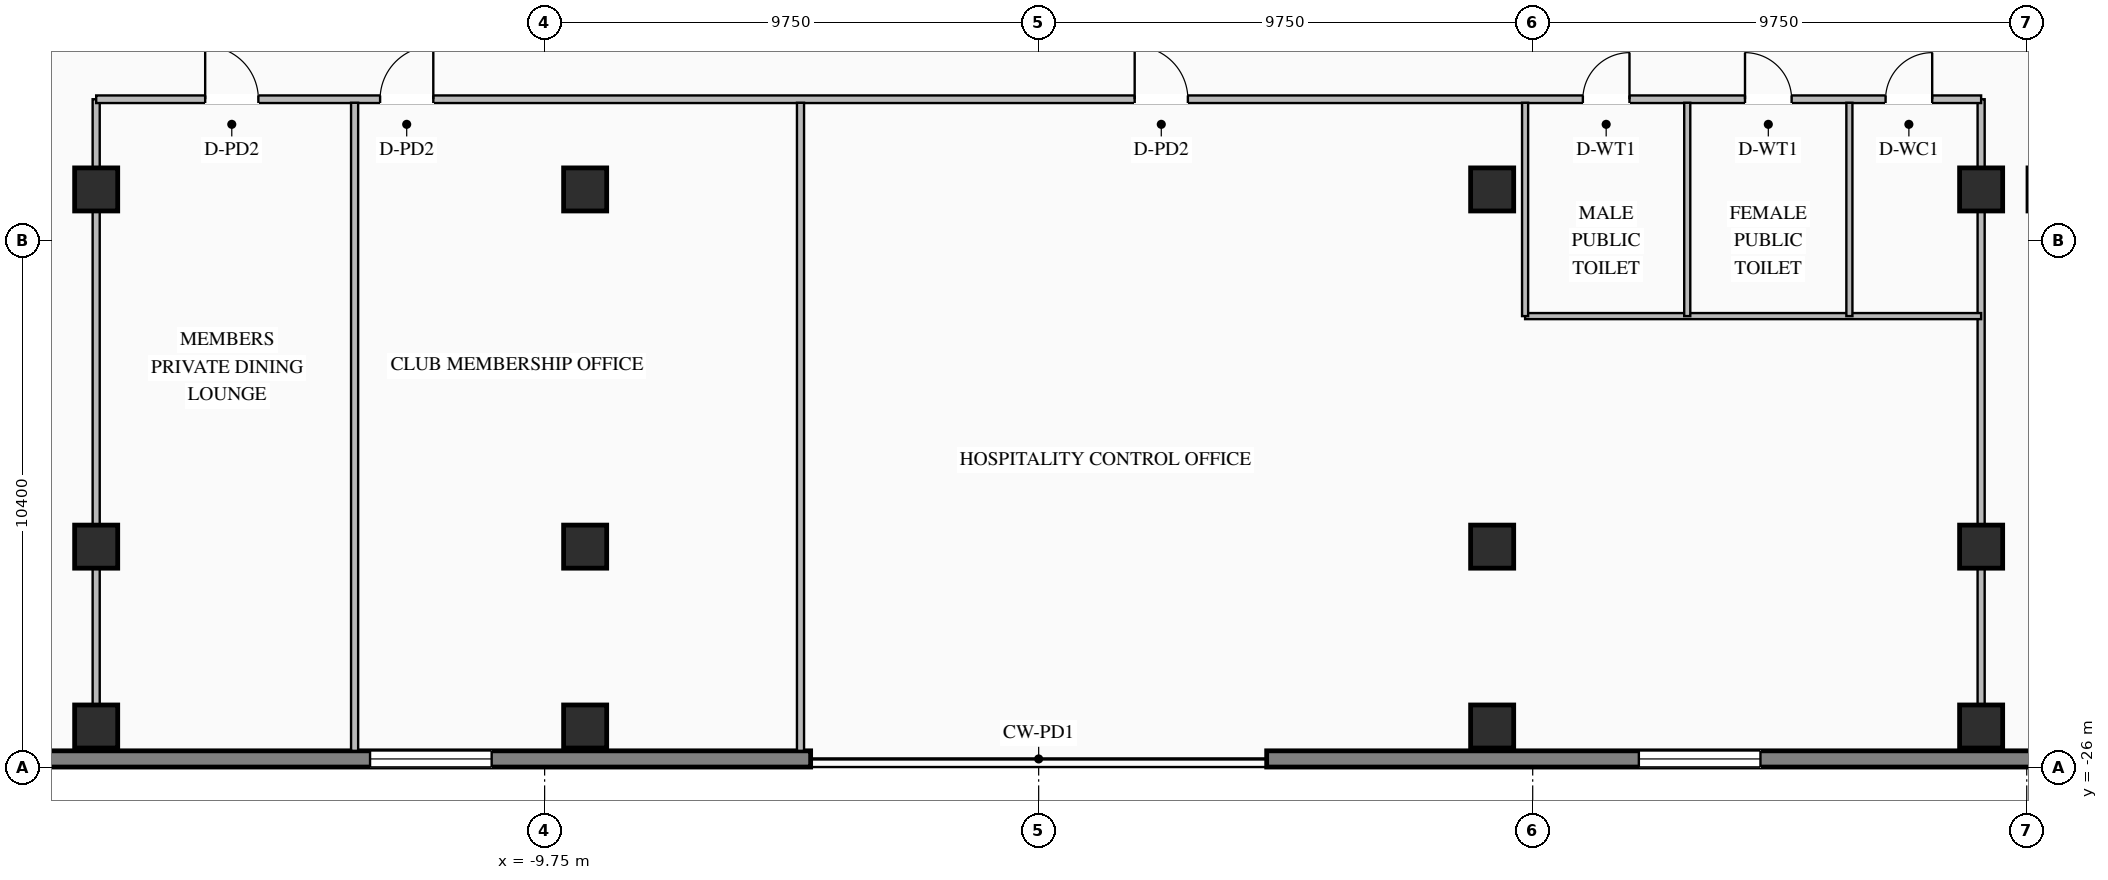
"""IFC4 building model, lengths in metres.
Left out: names, types, materials, properties, quantities, classifications, styles, units other than length and angle.
Written with IfcOpenShell. Run it as: python <this file> out.ifc"""

import sys

from ifc_helpers import new_model, si_unit, direction, frame, frame_2d, origin, origin_2d, place, context, subcontext, project, spatial, rectangle, i_section, extrude, element, fill, save


model = new_model("IFC4")
c1 = context("Model", 3, precision=1e-05, world=origin(), true_north=direction((0.0, 1.0)))
c2 = subcontext(c1, "Body", "Model", "MODEL_VIEW")
j1 = project(units=[si_unit("LENGTHUNIT", "METRE"), si_unit("PLANEANGLEUNIT", "RADIAN")], contexts=[c1])
p1 = place(None, origin())
s1 = spatial("IfcSite", under=j1, at=p1, CompositionType="ELEMENT")
p2 = place(p1, origin())
s2 = spatial("IfcBuilding", under=s1, at=p2, CompositionType="ELEMENT")
p3 = place(p2, frame((0.0, 0.0, 22.8)))
s3 = spatial("IfcBuildingStorey", under=s2, at=p3, CompositionType="ELEMENT", Elevation=22.8)
for number, where, z_axis, x_axis in (
    (1, (-18.6, -14.6, 0.0), (0.0, 0.0, 1.0), (1.0, 0.0, 0.0)),
    (2, (-8.95, -14.6, 0.0), (0.0, 0.0, 1.0), (1.0, 0.0, 0.0)),
    (3, (8.95, -14.6, 0.0), (0.0, 0.0, 1.0), (1.0, 0.0, 0.0)),
    (4, (18.6, -14.6, 0.0), (0.0, 0.0, 1.0), (1.0, 0.0, 0.0)),
    (5, (19.95, -14.6, 0.0), (0.0, 0.0, 1.0), (1.0, 0.0, 0.0)),
    (6, (-18.6, -21.65, 0.0), (0.0, 0.0, 1.0), (1.0, 0.0, 0.0)),
    (7, (-8.95, -21.65, 0.0), (0.0, 0.0, 1.0), (1.0, 0.0, 0.0)),
    (8, (8.95, -21.65, 0.0), (0.0, 0.0, 1.0), (1.0, 0.0, 0.0)),
    (9, (18.6, -21.65, 0.0), (0.0, 0.0, 1.0), (1.0, 0.0, 0.0)),
    (10, (-18.6, -25.2, 0.0), (0.0, 0.0, 1.0), (1.0, 0.0, 0.0)),
    (11, (-8.95, -25.2, 0.0), (0.0, 0.0, 1.0), (1.0, 0.0, 0.0)),
    (12, (8.95, -25.2, 0.0), (0.0, 0.0, 1.0), (1.0, 0.0, 0.0)),
    (13, (18.6, -25.2, 0.0), (0.0, 0.0, 1.0), (1.0, 0.0, 0.0)),
):
    element("IfcColumn", number, at=place(p3, frame(where, z_axis=z_axis, x_axis=x_axis)), inside=s3, PredefinedType="COLUMN", context=c2, shape_type="SweptSolid", body=[
        extrude(i_section(OverallWidth=0.85, OverallDepth=0.85, WebThickness=0.032, FlangeThickness=0.048, at=origin_2d()), origin(), (0.0, 0.0, 1.0), 4.2),
    ])
p4 = place(p3, frame((38.68, -25.84, 0.0), z_axis=(0.0, 0.0, 1.0), x_axis=(-1.0, 0.0, 0.0)))
e14 = element("IfcWall", 14, at=p4, inside=s3, PredefinedType="STANDARD", context=c2, shape_type="SweptSolid", body=[
    extrude(rectangle(XDim=34.18, YDim=0.32, at=frame_2d((17.09, 0.0))), origin(), (0.0, 0.0, 1.0), 3.9),
])
p5 = place(p4, frame((6.795, 0.0, 0.8)))
e15 = element("IfcOpeningElement", 15, at=p5, cuts=e14, PredefinedType="OPENING", context=c2, shape_type="SweptSolid", body=[
    extrude(rectangle(XDim=2.4, YDim=2.35, at=frame_2d((1.2, 1.175))), frame((0.0, 0.17, 0.0), z_axis=(0.0, -1.0, 0.0), x_axis=(1.0, 0.0, 0.0)), (0.0, 0.0, 1.0), 0.34),
])
p6 = place(p4, frame((16.44, 0.0, 0.8)))
e16 = element("IfcOpeningElement", 16, at=p6, cuts=e14, PredefinedType="OPENING", context=c2, shape_type="SweptSolid", body=[
    extrude(rectangle(XDim=2.4, YDim=2.35, at=frame_2d((1.2, 1.175))), frame((0.0, 0.17, 0.0), z_axis=(0.0, -1.0, 0.0), x_axis=(1.0, 0.0, 0.0)), (0.0, 0.0, 1.0), 0.34),
])
p7 = place(p4, frame((24.435, 0.0, 0.8)))
e17 = element("IfcOpeningElement", 17, at=p7, cuts=e14, PredefinedType="OPENING", context=c2, shape_type="SweptSolid", body=[
    extrude(rectangle(XDim=2.4, YDim=2.35, at=frame_2d((1.2, 1.175))), frame((0.0, 0.17, 0.0), z_axis=(0.0, -1.0, 0.0), x_axis=(1.0, 0.0, 0.0)), (0.0, 0.0, 1.0), 0.34),
])
p8 = place(p3, frame((-4.5, -25.84, 0.0), z_axis=(0.0, 0.0, 1.0), x_axis=(-1.0, 0.0, 0.0)))
e18 = element("IfcWall", 18, at=p8, inside=s3, PredefinedType="STANDARD", context=c2, shape_type="SweptSolid", body=[
    extrude(rectangle(XDim=34.18, YDim=0.32, at=frame_2d((17.09, 0.0))), origin(), (0.0, 0.0, 1.0), 3.9),
])
p9 = place(p8, frame((6.295, 0.0, 0.8)))
e19 = element("IfcOpeningElement", 19, at=p9, cuts=e18, PredefinedType="OPENING", context=c2, shape_type="SweptSolid", body=[
    extrude(rectangle(XDim=2.4, YDim=2.35, at=frame_2d((1.2, 1.175))), frame((0.0, 0.17, 0.0), z_axis=(0.0, -1.0, 0.0), x_axis=(1.0, 0.0, 0.0)), (0.0, 0.0, 1.0), 0.34),
])
p10 = place(p8, frame((15.34, 0.0, 0.8)))
e20 = element("IfcOpeningElement", 20, at=p10, cuts=e18, PredefinedType="OPENING", context=c2, shape_type="SweptSolid", body=[
    extrude(rectangle(XDim=2.4, YDim=2.35, at=frame_2d((1.2, 1.175))), frame((0.0, 0.17, 0.0), z_axis=(0.0, -1.0, 0.0), x_axis=(1.0, 0.0, 0.0)), (0.0, 0.0, 1.0), 0.34),
])
p11 = place(p8, frame((24.985, 0.0, 0.8)))
e21 = element("IfcOpeningElement", 21, at=p11, cuts=e18, PredefinedType="OPENING", context=c2, shape_type="SweptSolid", body=[
    extrude(rectangle(XDim=2.4, YDim=2.35, at=frame_2d((1.2, 1.175))), frame((0.0, 0.17, 0.0), z_axis=(0.0, -1.0, 0.0), x_axis=(1.0, 0.0, 0.0)), (0.0, 0.0, 1.0), 0.34),
])
for number, where, z_axis, x_axis in (
    (22, (-18.6, -25.68, 0.0), (0.0, 0.0, 1.0), (0.0, 1.0, 0.0)),
    (23, (18.6, -25.68, 0.0), (0.0, 0.0, 1.0), (0.0, 1.0, 0.0)),
):
    element("IfcWall", number, at=place(p3, frame(where, z_axis=z_axis, x_axis=x_axis)), inside=s3, PredefinedType="STANDARD", context=c2, shape_type="SweptSolid", body=[
        extrude(rectangle(XDim=12.86, YDim=0.14, at=frame_2d((6.43, 0.0))), origin(), (0.0, 0.0, 1.0), 3.295),
    ])
p12 = place(p3, frame((-18.6, -12.82, 0.0), z_axis=(0.0, 0.0, 1.0), x_axis=(1.0, 0.0, 0.0)))
e24 = element("IfcWall", 24, at=p12, inside=s3, PredefinedType="STANDARD", context=c2, shape_type="SweptSolid", body=[
    extrude(rectangle(XDim=37.2, YDim=0.15, at=frame_2d((18.6, 0.0))), origin(), (0.0, 0.0, 1.0), 3.9),
])
p13 = place(p12, frame((29.34, 0.0, 0.0)))
e25 = element("IfcOpeningElement", 25, at=p13, cuts=e24, PredefinedType="OPENING", context=c2, shape_type="SweptSolid", body=[
    extrude(rectangle(XDim=0.92, YDim=2.08, at=frame_2d((0.46, 1.04))), frame((0.0, 0.085, 0.0), z_axis=(0.0, -1.0, 0.0), x_axis=(1.0, 0.0, 0.0)), (0.0, 0.0, 1.0), 0.17),
])
p14 = place(p12, frame((32.54, 0.0, 0.0)))
e26 = element("IfcOpeningElement", 26, at=p14, cuts=e24, PredefinedType="OPENING", context=c2, shape_type="SweptSolid", body=[
    extrude(rectangle(XDim=0.92, YDim=2.08, at=frame_2d((0.46, 1.04))), frame((0.0, 0.085, 0.0), z_axis=(0.0, -1.0, 0.0), x_axis=(1.0, 0.0, 0.0)), (0.0, 0.0, 1.0), 0.17),
])
p15 = place(p12, frame((35.314, 0.0, 0.0)))
e27 = element("IfcOpeningElement", 27, at=p15, cuts=e24, PredefinedType="OPENING", context=c2, shape_type="SweptSolid", body=[
    extrude(rectangle(XDim=0.92, YDim=2.08, at=frame_2d((0.46, 1.04))), frame((0.0, 0.085, 0.0), z_axis=(0.0, -1.0, 0.0), x_axis=(1.0, 0.0, 0.0)), (0.0, 0.0, 1.0), 0.17),
])
p16 = place(p12, frame((2.151, 0.0, 0.0)))
e28 = element("IfcOpeningElement", 28, at=p16, cuts=e24, PredefinedType="OPENING", context=c2, shape_type="SweptSolid", body=[
    extrude(rectangle(XDim=1.05, YDim=2.08, at=frame_2d((0.525, 1.04))), frame((0.0, 0.085, 0.0), z_axis=(0.0, -1.0, 0.0), x_axis=(1.0, 0.0, 0.0)), (0.0, 0.0, 1.0), 0.17),
])
p17 = place(p12, frame((5.603, 0.0, 0.0)))
e29 = element("IfcOpeningElement", 29, at=p17, cuts=e24, PredefinedType="OPENING", context=c2, shape_type="SweptSolid", body=[
    extrude(rectangle(XDim=1.05, YDim=2.08, at=frame_2d((0.525, 1.04))), frame((0.0, 0.085, 0.0), z_axis=(0.0, -1.0, 0.0), x_axis=(1.0, 0.0, 0.0)), (0.0, 0.0, 1.0), 0.17),
])
p18 = place(p12, frame((20.495, 0.0, 0.0)))
e30 = element("IfcOpeningElement", 30, at=p18, cuts=e24, PredefinedType="OPENING", context=c2, shape_type="SweptSolid", body=[
    extrude(rectangle(XDim=1.05, YDim=2.08, at=frame_2d((0.525, 1.04))), frame((0.0, 0.085, 0.0), z_axis=(0.0, -1.0, 0.0), x_axis=(1.0, 0.0, 0.0)), (0.0, 0.0, 1.0), 0.17),
])
p19 = place(p3, frame((9.6, -17.1, 0.0), z_axis=(0.0, 0.0, 1.0), x_axis=(1.0, 0.0, 0.0)))
e31 = element("IfcWall", 31, at=p19, inside=s3, PredefinedType="STANDARD", context=c2, shape_type="SweptSolid", body=[
    extrude(rectangle(XDim=9.0, YDim=0.12, at=frame_2d((4.5, 0.0))), origin(), (0.0, 0.0, 1.0), 3.9),
])
for number, where, z_axis, x_axis in (
    (32, (9.6, -17.1, 0.0), (0.0, 0.0, 1.0), (0.0, 1.0, 0.0)),
    (33, (12.8, -17.1, 0.0), (0.0, 0.0, 1.0), (0.0, 1.0, 0.0)),
    (34, (16.0, -17.1, 0.0), (0.0, 0.0, 1.0), (0.0, 1.0, 0.0)),
):
    element("IfcWall", number, at=place(p3, frame(where, z_axis=z_axis, x_axis=x_axis)), inside=s3, PredefinedType="STANDARD", context=c2, shape_type="SweptSolid", body=[
        extrude(rectangle(XDim=4.21, YDim=0.12, at=frame_2d((2.105, 0.0))), origin(), (0.0, 0.0, 1.0), 3.9),
    ])
for number, where, z_axis, x_axis in (
    (35, (-13.5, -25.68, 0.0), (0.0, 0.0, 1.0), (0.0, 1.0, 0.0)),
    (36, (-4.7, -25.68, 0.0), (0.0, 0.0, 1.0), (0.0, 1.0, 0.0)),
):
    element("IfcWall", number, at=place(p3, frame(where, z_axis=z_axis, x_axis=x_axis)), inside=s3, PredefinedType="STANDARD", context=c2, shape_type="SweptSolid", body=[
        extrude(rectangle(XDim=12.79, YDim=0.14, at=frame_2d((6.395, 0.0))), origin(), (0.0, 0.0, 1.0), 3.9),
    ])
p20 = place(p7, origin())
e37 = element("IfcWindow", 37, at=p20, inside=s3, PartitioningType="DOUBLE_PANEL_VERTICAL", PredefinedType="WINDOW", context=c2, shape_type="SweptSolid", body=[
    extrude(rectangle(XDim=2.4, YDim=2.35, at=frame_2d((1.2, 1.175))), frame((0.0, 0.03, 0.0), z_axis=(0.0, -1.0, 0.0), x_axis=(1.0, 0.0, 0.0)), (0.0, 0.0, 1.0), 0.06),
])
fill(e17, e37)
p21 = place(p9, origin())
e38 = element("IfcWindow", 38, at=p21, inside=s3, PartitioningType="DOUBLE_PANEL_VERTICAL", PredefinedType="WINDOW", context=c2, shape_type="SweptSolid", body=[
    extrude(rectangle(XDim=2.4, YDim=2.35, at=frame_2d((1.2, 1.175))), frame((0.0, 0.03, 0.0), z_axis=(0.0, -1.0, 0.0), x_axis=(1.0, 0.0, 0.0)), (0.0, 0.0, 1.0), 0.06),
])
fill(e19, e38)
p22 = place(p13, origin())
e39 = element("IfcDoor", 39, at=p22, inside=s3, OperationType="SINGLE_SWING_RIGHT", PredefinedType="DOOR", context=c2, shape_type="SweptSolid", body=[
    extrude(rectangle(XDim=0.92, YDim=2.08, at=frame_2d((0.46, 1.04))), frame((0.0, 0.025, 0.0), z_axis=(0.0, -1.0, 0.0), x_axis=(1.0, 0.0, 0.0)), (0.0, 0.0, 1.0), 0.05),
])
fill(e25, e39)
p23 = place(p14, origin())
e40 = element("IfcDoor", 40, at=p23, inside=s3, OperationType="SINGLE_SWING_LEFT", PredefinedType="DOOR", context=c2, shape_type="SweptSolid", body=[
    extrude(rectangle(XDim=0.92, YDim=2.08, at=frame_2d((0.46, 1.04))), frame((0.0, 0.025, 0.0), z_axis=(0.0, -1.0, 0.0), x_axis=(1.0, 0.0, 0.0)), (0.0, 0.0, 1.0), 0.05),
])
fill(e26, e40)
p24 = place(p15, origin())
e41 = element("IfcDoor", 41, at=p24, inside=s3, OperationType="SINGLE_SWING_RIGHT", PredefinedType="DOOR", context=c2, shape_type="SweptSolid", body=[
    extrude(rectangle(XDim=0.92, YDim=2.08, at=frame_2d((0.46, 1.04))), frame((0.0, 0.025, 0.0), z_axis=(0.0, -1.0, 0.0), x_axis=(1.0, 0.0, 0.0)), (0.0, 0.0, 1.0), 0.05),
])
fill(e27, e41)
p25 = place(p16, origin())
e42 = element("IfcDoor", 42, at=p25, inside=s3, OperationType="SINGLE_SWING_LEFT", PredefinedType="DOOR", context=c2, shape_type="SweptSolid", body=[
    extrude(rectangle(XDim=1.05, YDim=2.08, at=frame_2d((0.525, 1.04))), frame((0.0, 0.025, 0.0), z_axis=(0.0, -1.0, 0.0), x_axis=(1.0, 0.0, 0.0)), (0.0, 0.0, 1.0), 0.05),
])
fill(e28, e42)
p26 = place(p17, origin())
e43 = element("IfcDoor", 43, at=p26, inside=s3, OperationType="SINGLE_SWING_RIGHT", PredefinedType="DOOR", context=c2, shape_type="SweptSolid", body=[
    extrude(rectangle(XDim=1.05, YDim=2.08, at=frame_2d((0.525, 1.04))), frame((0.0, 0.025, 0.0), z_axis=(0.0, -1.0, 0.0), x_axis=(1.0, 0.0, 0.0)), (0.0, 0.0, 1.0), 0.05),
])
fill(e29, e43)
p27 = place(p18, origin())
e44 = element("IfcDoor", 44, at=p27, inside=s3, OperationType="SINGLE_SWING_LEFT", PredefinedType="DOOR", context=c2, shape_type="SweptSolid", body=[
    extrude(rectangle(XDim=1.05, YDim=2.08, at=frame_2d((0.525, 1.04))), frame((0.0, 0.025, 0.0), z_axis=(0.0, -1.0, 0.0), x_axis=(1.0, 0.0, 0.0)), (0.0, 0.0, 1.0), 0.05),
])
fill(e30, e44)
save(model, sys.argv[1])
